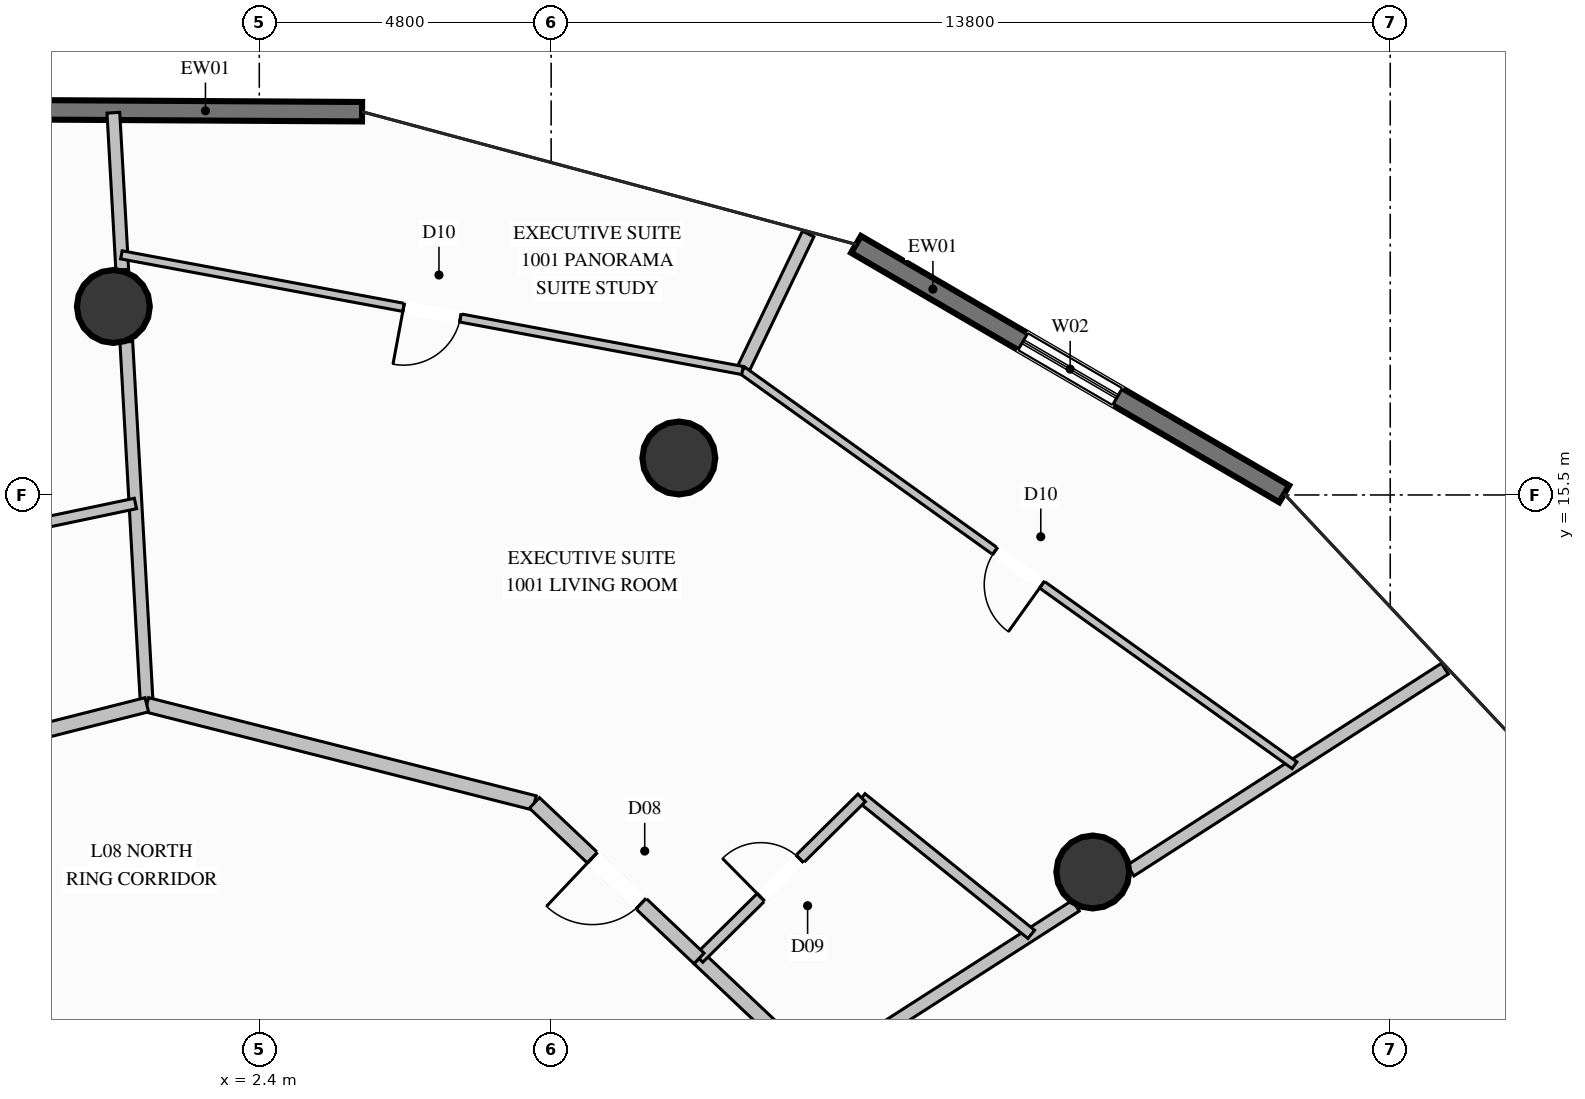
"""IFC4 building model, lengths in metres.
Left out: names, types, materials, properties, quantities, classifications, styles, units other than length and angle.
Written with IfcOpenShell. Run it as: python <this file> out.ifc"""

import sys

from ifc_helpers import new_model, si_unit, direction, frame, frame_2d, origin, origin_2d, place, context, subcontext, project, spatial, rectangle, circle, extrude, element, fill, save


model = new_model("IFC4")
c1 = context("Model", 3, precision=1e-05, world=origin(), true_north=direction((0.0, 1.0)))
c2 = subcontext(c1, "Body", "Model", "MODEL_VIEW")
j1 = project(units=[si_unit("LENGTHUNIT", "METRE"), si_unit("PLANEANGLEUNIT", "RADIAN")], contexts=[c1])
p1 = place(None, origin())
s1 = spatial("IfcSite", under=j1, at=p1, CompositionType="ELEMENT")
p2 = place(p1, origin())
s2 = spatial("IfcBuilding", under=s1, at=p2, CompositionType="ELEMENT")
p3 = place(p2, frame((0.0, 0.0, 39.2)))
s3 = spatial("IfcBuildingStorey", under=s2, at=p3, CompositionType="ELEMENT", Elevation=39.2)
for number, where, z_axis, x_axis in (
    (1, (16.108, 9.3, 0.0), (0.0, 0.0, 1.0), (1.0, 0.0, 0.0)),
    (2, (9.3, 16.108, 0.0), (0.0, 0.0, 1.0), (1.0, 0.0, 0.0)),
    (3, (0.0, 18.6, 0.0), (0.0, 0.0, 1.0), (1.0, 0.0, 0.0)),
):
    element("IfcColumn", number, at=place(p3, frame(where, z_axis=z_axis, x_axis=x_axis)), inside=s3, PredefinedType="COLUMN", context=c2, shape_type="SweptSolid", body=[
        extrude(circle(Radius=0.6, at=origin_2d()), origin(), (0.0, 0.0, 1.0), 3.6),
    ])
p4 = place(p3, frame((12.215, 19.621, 0.0), z_axis=(0.0, 0.0, 1.0), x_axis=(0.864004822612, -0.503483531512, 0.0)))
e4 = element("IfcWall", 4, at=p4, inside=s3, PredefinedType="SOLIDWALL", context=c2, shape_type="SweptSolid", body=[
    extrude(rectangle(XDim=8.149, YDim=0.32, at=frame_2d((4.075, 0.0))), origin(), (0.0, 0.0, 1.0), 3.34),
])
p5 = place(p4, frame((3.175, 0.0, 0.35)))
e5 = element("IfcOpeningElement", 5, at=p5, cuts=e4, PredefinedType="OPENING", context=c2, shape_type="SweptSolid", body=[
    extrude(rectangle(XDim=1.8, YDim=2.6, at=frame_2d((0.9, 1.3))), frame((0.0, 0.17, 0.0), z_axis=(0.0, -1.0, 0.0), x_axis=(1.0, 0.0, 0.0)), (0.0, 0.0, 1.0), 0.34),
])
p6 = place(p3, frame((-4.322, 21.851, 0.0), z_axis=(0.0, 0.0, 1.0), x_axis=(0.999983655859, -0.005717343284, 0.0)))
e6 = element("IfcWall", 6, at=p6, inside=s3, PredefinedType="SOLIDWALL", context=c2, shape_type="SweptSolid", body=[
    extrude(rectangle(XDim=8.412, YDim=0.32, at=frame_2d((4.206, 0.0))), origin(), (0.0, 0.0, 1.0), 3.34),
])
p7 = place(p6, frame((1.211, 0.0, 0.35)))
e7 = element("IfcOpeningElement", 7, at=p7, cuts=e6, PredefinedType="OPENING", context=c2, shape_type="SweptSolid", body=[
    extrude(rectangle(XDim=1.8, YDim=2.6, at=frame_2d((0.9, 1.3))), frame((0.0, 0.17, 0.0), z_axis=(0.0, -1.0, 0.0), x_axis=(1.0, 0.0, 0.0)), (0.0, 0.0, 1.0), 0.34),
])
p8 = place(p3, frame((11.592, 6.025, 0.0), z_axis=(0.0, 0.0, 1.0), x_axis=(0.841416256493, 0.540387530675, 0.0)))
e8 = element("IfcWall", 8, at=p8, inside=s3, PredefinedType="PARTITIONING", context=c2, shape_type="SweptSolid", body=[
    extrude(rectangle(XDim=5.036, YDim=0.21, at=frame_2d((2.518, 0.0))), origin(), (0.0, 0.0, 1.0), 2.709),
])
p9 = place(p3, frame((16.728, 9.323, 0.0), z_axis=(0.0, 0.0, 1.0), x_axis=(0.841434006825, 0.54035989133, 0.0)))
e9 = element("IfcWall", 9, at=p9, inside=s3, PredefinedType="PARTITIONING", context=c2, shape_type="SweptSolid", body=[
    extrude(rectangle(XDim=6.144, YDim=0.21, at=frame_2d((3.072, 0.0))), origin(), (0.0, 0.0, 1.0), 3.34),
])
p10 = place(p3, frame((0.55, 12.05, 0.0), z_axis=(0.0, 0.0, 1.0), x_axis=(-0.056404232662, 0.998408014059, 0.0)))
e10 = element("IfcWall", 10, at=p10, inside=s3, PredefinedType="PARTITIONING", context=c2, shape_type="SweptSolid", body=[
    extrude(rectangle(XDim=5.978, YDim=0.21, at=frame_2d((2.989, 0.0))), origin(), (0.0, 0.0, 1.0), 2.709),
])
p11 = place(p3, frame((0.146, 19.203, 0.0), z_axis=(0.0, 0.0, 1.0), x_axis=(-0.056431669685, 0.998406463649, 0.0)))
e11 = element("IfcWall", 11, at=p11, inside=s3, PredefinedType="PARTITIONING", context=c2, shape_type="SweptSolid", body=[
    extrude(rectangle(XDim=2.587, YDim=0.21, at=frame_2d((1.293, 0.0))), origin(), (0.0, 0.0, 1.0), 3.34),
])
p12 = place(p3, frame((11.592, 6.025, 0.0), z_axis=(0.0, 0.0, 1.0), x_axis=(-0.726651583854, 0.687006168591, 0.0)))
e12 = element("IfcWall", 12, at=p12, inside=s3, PredefinedType="PARTITIONING", context=c2, shape_type="SweptSolid", body=[
    extrude(rectangle(XDim=2.697, YDim=0.24, at=frame_2d((1.349, 0.0))), origin(), (0.0, 0.0, 1.0), 3.34),
])
p13 = place(p3, frame((15.096, 8.275, 0.0), z_axis=(0.0, 0.0, 1.0), x_axis=(-0.779109173808, 0.626888263799, 0.0)))
e13 = element("IfcWall", 13, at=p13, inside=s3, PredefinedType="PLUMBINGWALL", context=c2, shape_type="SweptSolid", body=[
    extrude(rectangle(XDim=3.58, YDim=0.175, at=frame_2d((1.79, 0.0))), origin(), (0.0, 0.0, 1.0), 3.34),
])
p14 = place(p3, frame((9.632, 7.878, 0.0), z_axis=(0.0, 0.0, 1.0), x_axis=(0.711574015507, 0.702611144556, 0.0)))
e14 = element("IfcWall", 14, at=p14, inside=s3, PredefinedType="PLUMBINGWALL", context=c2, shape_type="SweptSolid", body=[
    extrude(rectangle(XDim=3.759, YDim=0.175, at=frame_2d((1.879, 0.0))), origin(), (0.0, 0.0, 1.0), 3.34),
])
p15 = place(p14, frame((1.43, 0.0, 0.0)))
e15 = element("IfcOpeningElement", 15, at=p15, cuts=e14, PredefinedType="OPENING", context=c2, shape_type="SweptSolid", body=[
    extrude(rectangle(XDim=0.9, YDim=2.1, at=frame_2d((0.45, 1.05))), frame((0.0, 0.098, 0.0), z_axis=(0.0, -1.0, 0.0), x_axis=(1.0, 0.0, 0.0)), (0.0, 0.0, 1.0), 0.195),
])
p16 = place(p3, frame((10.347, 17.547, 0.0), z_axis=(0.0, 0.0, 1.0), x_axis=(0.433406141617, 0.901198710834, 0.0)))
e16 = element("IfcWall", 16, at=p16, inside=s3, PredefinedType="PARTITIONING", context=c2, shape_type="SweptSolid", body=[
    extrude(rectangle(XDim=2.492, YDim=0.21, at=frame_2d((1.246, 0.0))), origin(), (0.0, 0.0, 1.0), 3.34),
])
p17 = place(p3, frame((6.925, 10.436, 0.0), z_axis=(0.0, 0.0, 1.0), x_axis=(-0.969413132073, 0.245434674331, 0.0)))
e17 = element("IfcWall", 17, at=p17, inside=s3, PredefinedType="PARTITIONING", context=c2, shape_type="SweptSolid", body=[
    extrude(rectangle(XDim=6.576, YDim=0.24, at=frame_2d((3.288, 0.0))), origin(), (0.0, 0.0, 1.0), 3.34),
])
p18 = place(p3, frame((9.632, 7.878, 0.0), z_axis=(0.0, 0.0, 1.0), x_axis=(-0.726816794063, 0.686831382413, 0.0)))
e18 = element("IfcWall", 18, at=p18, inside=s3, PredefinedType="PARTITIONING", context=c2, shape_type="SweptSolid", body=[
    extrude(rectangle(XDim=3.725, YDim=0.24, at=frame_2d((1.862, 0.0))), origin(), (0.0, 0.0, 1.0), 3.34),
])
p19 = place(p18, frame((1.312, 0.0, 0.0)))
e19 = element("IfcOpeningElement", 19, at=p19, cuts=e18, PredefinedType="OPENING", context=c2, shape_type="SweptSolid", body=[
    extrude(rectangle(XDim=1.1, YDim=2.3, at=frame_2d((0.55, 1.15))), frame((0.0, 0.13, 0.0), z_axis=(0.0, -1.0, 0.0), x_axis=(1.0, 0.0, 0.0)), (0.0, 0.0, 1.0), 0.26),
])
p20 = place(p3, frame((19.425, 11.055, 0.0), z_axis=(0.0, 0.0, 1.0), x_axis=(-0.813402257194, 0.581701614224, 0.0)))
e20 = element("IfcWall", 20, at=p20, inside=s3, PredefinedType="PARTITIONING", context=c2, shape_type="SweptSolid", body=[
    extrude(rectangle(XDim=11.161, YDim=0.135, at=frame_2d((5.58, 0.0))), origin(), (0.0, 0.0, 1.0), 3.34),
])
p21 = place(p20, frame((5.105, 0.0, 0.0)))
e21 = element("IfcOpeningElement", 21, at=p21, cuts=e20, PredefinedType="OPENING", context=c2, shape_type="SweptSolid", body=[
    extrude(rectangle(XDim=0.95, YDim=2.1, at=frame_2d((0.475, 1.05))), frame((0.0, 0.078, 0.0), z_axis=(0.0, -1.0, 0.0), x_axis=(1.0, 0.0, 0.0)), (0.0, 0.0, 1.0), 0.155),
])
p22 = place(p3, frame((10.347, 17.547, 0.0), z_axis=(0.0, 0.0, 1.0), x_axis=(-0.983105475238, 0.183039953444, 0.0)))
e22 = element("IfcWall", 22, at=p22, inside=s3, PredefinedType="PARTITIONING", context=c2, shape_type="SweptSolid", body=[
    extrude(rectangle(XDim=10.39, YDim=0.135, at=frame_2d((5.195, 0.0))), origin(), (0.0, 0.0, 1.0), 3.34),
])
p23 = place(p22, frame((4.72, 0.0, 0.0)))
e23 = element("IfcOpeningElement", 23, at=p23, cuts=e22, PredefinedType="OPENING", context=c2, shape_type="SweptSolid", body=[
    extrude(rectangle(XDim=0.95, YDim=2.1, at=frame_2d((0.475, 1.05))), frame((0.0, 0.078, 0.0), z_axis=(0.0, -1.0, 0.0), x_axis=(1.0, 0.0, 0.0)), (0.0, 0.0, 1.0), 0.155),
])
p24 = place(p3, frame((0.55, 12.05, 0.0), z_axis=(0.0, 0.0, 1.0), x_axis=(-0.969394271919, -0.245509155779, 0.0)))
e24 = element("IfcWall", 24, at=p24, inside=s3, PredefinedType="PARTITIONING", context=c2, shape_type="SweptSolid", body=[
    extrude(rectangle(XDim=2.761, YDim=0.24, at=frame_2d((1.381, 0.0))), origin(), (0.0, 0.0, 1.0), 3.34),
])
p25 = place(p3, frame((0.363, 15.36, 0.0), z_axis=(0.0, 0.0, 1.0), x_axis=(-0.978687186143, -0.205356742475, 0.0)))
e25 = element("IfcWall", 25, at=p25, inside=s3, PredefinedType="PLUMBINGWALL", context=c2, shape_type="SweptSolid", body=[
    extrude(rectangle(XDim=3.482, YDim=0.175, at=frame_2d((1.741, 0.0))), origin(), (0.0, 0.0, 1.0), 3.34),
])
p26 = place(p5, origin())
e26 = element("IfcWindow", 26, at=p26, inside=s3, PartitioningType="SINGLE_PANEL", PredefinedType="WINDOW", context=c2, shape_type="SweptSolid", body=[
    extrude(rectangle(XDim=1.8, YDim=2.6, at=frame_2d((0.9, 1.3))), frame((0.0, 0.03, 0.0), z_axis=(0.0, -1.0, 0.0), x_axis=(1.0, 0.0, 0.0)), (0.0, 0.0, 1.0), 0.06),
])
fill(e5, e26)
p27 = place(p15, origin())
e27 = element("IfcDoor", 27, at=p27, inside=s3, OperationType="SINGLE_SWING_LEFT", PredefinedType="DOOR", context=c2, shape_type="SweptSolid", body=[
    extrude(rectangle(XDim=0.9, YDim=2.1, at=frame_2d((0.45, 1.05))), frame((0.0, 0.025, 0.0), z_axis=(0.0, -1.0, 0.0), x_axis=(1.0, 0.0, 0.0)), (0.0, 0.0, 1.0), 0.05),
])
fill(e15, e27)
p28 = place(p19, origin())
e28 = element("IfcDoor", 28, at=p28, inside=s3, OperationType="SINGLE_SWING_RIGHT", PredefinedType="DOOR", context=c2, shape_type="SweptSolid", body=[
    extrude(rectangle(XDim=1.1, YDim=2.3, at=frame_2d((0.55, 1.15))), frame((0.0, 0.025, 0.0), z_axis=(0.0, -1.0, 0.0), x_axis=(1.0, 0.0, 0.0)), (0.0, 0.0, 1.0), 0.05),
])
fill(e19, e28)
p29 = place(p21, origin())
e29 = element("IfcDoor", 29, at=p29, inside=s3, OperationType="SINGLE_SWING_LEFT", PredefinedType="DOOR", context=c2, shape_type="SweptSolid", body=[
    extrude(rectangle(XDim=0.95, YDim=2.1, at=frame_2d((0.475, 1.05))), frame((0.0, 0.025, 0.0), z_axis=(0.0, -1.0, 0.0), x_axis=(1.0, 0.0, 0.0)), (0.0, 0.0, 1.0), 0.05),
])
fill(e21, e29)
p30 = place(p23, origin())
e30 = element("IfcDoor", 30, at=p30, inside=s3, OperationType="SINGLE_SWING_RIGHT", PredefinedType="DOOR", context=c2, shape_type="SweptSolid", body=[
    extrude(rectangle(XDim=0.95, YDim=2.1, at=frame_2d((0.475, 1.05))), frame((0.0, 0.025, 0.0), z_axis=(0.0, -1.0, 0.0), x_axis=(1.0, 0.0, 0.0)), (0.0, 0.0, 1.0), 0.05),
])
fill(e23, e30)
save(model, sys.argv[1])
